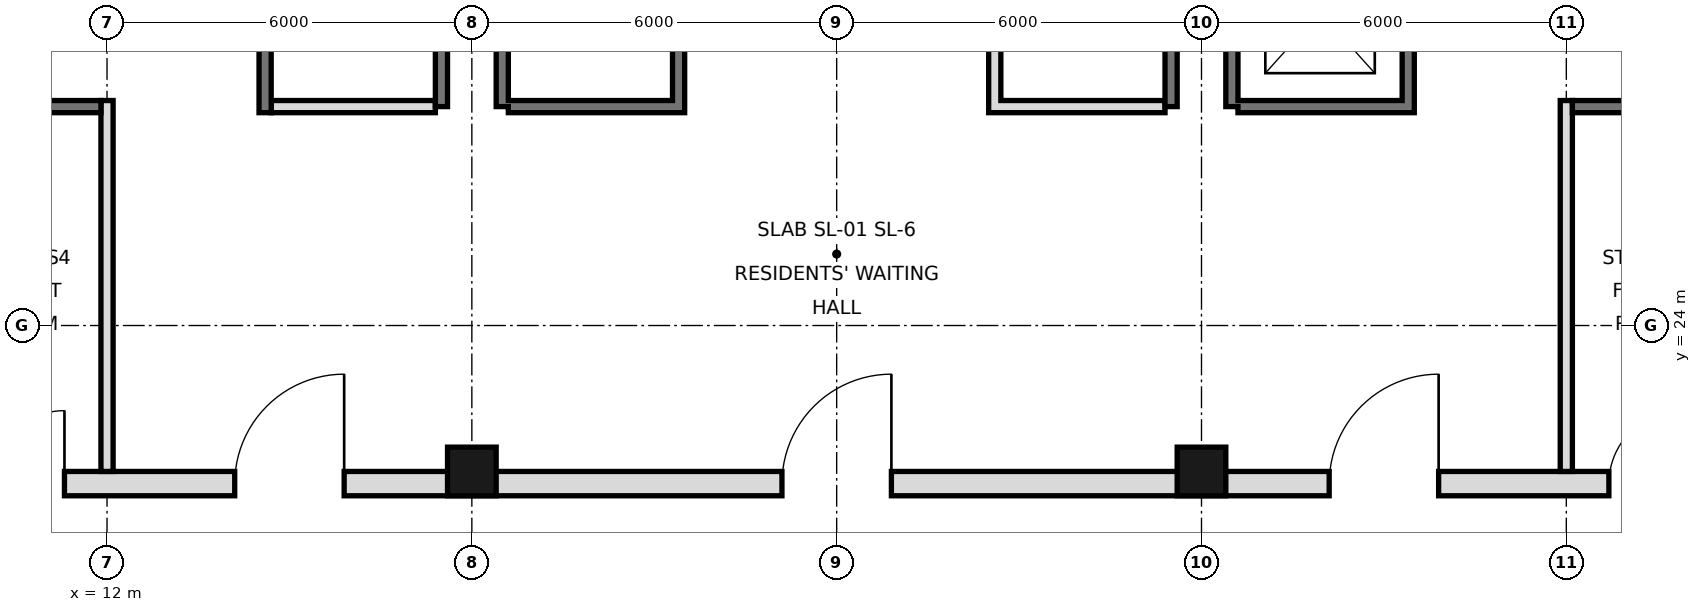
"""IFC4 building model, lengths in metres.
Left out: names, types, materials, properties, quantities, classifications, styles, units other than length and angle.
Written with IfcOpenShell. Run it as: python <this file> out.ifc"""

import sys

from ifc_helpers import new_model, si_unit, direction, frame, frame_2d, origin, origin_2d, place, context, subcontext, project, spatial, rectangle, hollow_rectangle, extrude, element, fill, save


model = new_model("IFC4")
c1 = context("Model", 3, precision=1e-05, world=origin(), true_north=direction((0.0, 1.0)))
c2 = subcontext(c1, "Body", "Model", "MODEL_VIEW")
j1 = project(units=[si_unit("LENGTHUNIT", "METRE"), si_unit("PLANEANGLEUNIT", "RADIAN")], contexts=[c1])
p1 = place(None, origin())
s1 = spatial("IfcSite", under=j1, at=p1, CompositionType="ELEMENT")
p2 = place(p1, origin())
s2 = spatial("IfcBuilding", under=s1, at=p2, CompositionType="ELEMENT")
p3 = place(p2, frame((0.0, 0.0, 192.0)))
s3 = spatial("IfcBuildingStorey", under=s2, at=p3, CompositionType="ELEMENT", Elevation=192.0)
for number, where, z_axis, x_axis in (
    (1, (18.0, 21.6, 0.0), (0.0, 0.0, 1.0), (1.0, 0.0, 0.0)),
    (2, (30.0, 21.6, 0.0), (0.0, 0.0, 1.0), (1.0, 0.0, 0.0)),
):
    element("IfcColumn", number, at=place(p3, frame(where, z_axis=z_axis, x_axis=x_axis)), inside=s3, PredefinedType="COLUMN", context=c2, shape_type="SweptSolid", body=[
        extrude(hollow_rectangle(XDim=0.8, YDim=0.8, WallThickness=0.045, at=origin_2d()), origin(), (0.0, 0.0, 1.0), 3.6),
    ])
for number, where, z_axis, x_axis in (
    (3, (17.5, 27.6, 0.0), (0.0, 0.0, 1.0), (0.0, 1.0, 0.0)),
    (4, (18.5, 27.6, 0.0), (0.0, 0.0, 1.0), (0.0, 1.0, 0.0)),
    (5, (29.5, 27.6, 0.0), (0.0, 0.0, 1.0), (0.0, 1.0, 0.0)),
    (6, (30.5, 27.6, 0.0), (0.0, 0.0, 1.0), (0.0, 1.0, 0.0)),
):
    element("IfcWall", number, at=place(p3, frame(where, z_axis=z_axis, x_axis=x_axis)), inside=s3, PredefinedType="SOLIDWALL", context=c2, shape_type="SweptSolid", body=[
        extrude(rectangle(XDim=17.5, YDim=0.2, at=frame_2d((8.75, 0.0))), origin(), (0.0, 0.0, 1.0), 3.42),
    ])
p4 = place(p3, frame((5.6, 21.4, 0.0), z_axis=(0.0, 0.0, 1.0), x_axis=(1.0, 0.0, 0.0)))
e7 = element("IfcWall", 7, at=p4, inside=s3, PredefinedType="SOLIDWALL", context=c2, shape_type="SweptSolid", body=[
    extrude(rectangle(XDim=36.8, YDim=0.4, at=frame_2d((18.4, 0.0))), origin(), (0.0, 0.0, 1.0), 3.42),
])
p5 = place(p4, frame((8.5, 0.0, 0.0)))
e8 = element("IfcOpeningElement", 8, at=p5, cuts=e7, PredefinedType="OPENING", context=c2, shape_type="SweptSolid", body=[
    extrude(rectangle(XDim=1.8, YDim=2.1, at=frame_2d((0.9, 1.05))), frame((0.0, 0.21, 0.0), z_axis=(0.0, -1.0, 0.0), x_axis=(1.0, 0.0, 0.0)), (0.0, 0.0, 1.0), 0.42),
])
p6 = place(p4, frame((17.5, 0.0, 0.0)))
e9 = element("IfcOpeningElement", 9, at=p6, cuts=e7, PredefinedType="OPENING", context=c2, shape_type="SweptSolid", body=[
    extrude(rectangle(XDim=1.8, YDim=2.1, at=frame_2d((0.9, 1.05))), frame((0.0, 0.21, 0.0), z_axis=(0.0, -1.0, 0.0), x_axis=(1.0, 0.0, 0.0)), (0.0, 0.0, 1.0), 0.42),
])
p7 = place(p4, frame((26.5, 0.0, 0.0)))
e10 = element("IfcOpeningElement", 10, at=p7, cuts=e7, PredefinedType="OPENING", context=c2, shape_type="SweptSolid", body=[
    extrude(rectangle(XDim=1.8, YDim=2.1, at=frame_2d((0.9, 1.05))), frame((0.0, 0.21, 0.0), z_axis=(0.0, -1.0, 0.0), x_axis=(1.0, 0.0, 0.0)), (0.0, 0.0, 1.0), 0.42),
])
p8 = place(p4, frame((4.5, 0.0, 0.0)))
e11 = element("IfcOpeningElement", 11, at=p8, cuts=e7, PredefinedType="OPENING", context=c2, shape_type="SweptSolid", body=[
    extrude(rectangle(XDim=1.2, YDim=2.1, at=frame_2d((0.6, 1.05))), frame((0.0, 0.21, 0.0), z_axis=(0.0, -1.0, 0.0), x_axis=(1.0, 0.0, 0.0)), (0.0, 0.0, 1.0), 0.42),
])
p9 = place(p4, frame((31.1, 0.0, 0.0)))
e12 = element("IfcOpeningElement", 12, at=p9, cuts=e7, PredefinedType="OPENING", context=c2, shape_type="SweptSolid", body=[
    extrude(rectangle(XDim=1.2, YDim=2.1, at=frame_2d((0.6, 1.05))), frame((0.0, 0.21, 0.0), z_axis=(0.0, -1.0, 0.0), x_axis=(1.0, 0.0, 0.0)), (0.0, 0.0, 1.0), 0.42),
])
p10 = place(p3, frame((12.0, 21.6, 0.0), z_axis=(0.0, 0.0, 1.0), x_axis=(0.0, 1.0, 0.0)))
e13 = element("IfcWall", 13, at=p10, inside=s3, PredefinedType="PARTITIONING", context=c2, shape_type="SweptSolid", body=[
    extrude(rectangle(XDim=6.1, YDim=0.2, at=frame_2d((3.05, 0.0))), origin(), (0.0, 0.0, 1.0), 3.42),
])
p11 = place(p3, frame((14.6, 27.5, 0.0), z_axis=(0.0, 0.0, 1.0), x_axis=(0.0, 1.0, 0.0)))
e14 = element("IfcWall", 14, at=p11, inside=s3, PredefinedType="SOLIDWALL", context=c2, shape_type="SweptSolid", body=[
    extrude(rectangle(XDim=17.5, YDim=0.2, at=frame_2d((8.75, 0.0))), origin(), (0.0, 0.0, 1.0), 3.42),
])
p12 = place(p11, frame((15.4, 0.0, 0.0)))
e15 = element("IfcOpeningElement", 15, at=p12, cuts=e14, PredefinedType="OPENING", context=c2, shape_type="SweptSolid", body=[
    extrude(rectangle(XDim=1.1, YDim=2.1, at=frame_2d((0.55, 1.05))), frame((0.0, 0.11, 0.0), z_axis=(0.0, -1.0, 0.0), x_axis=(1.0, 0.0, 0.0)), (0.0, 0.0, 1.0), 0.22),
])
p13 = place(p11, frame((2.7, 0.0, 0.0)))
e16 = element("IfcOpeningElement", 16, at=p13, cuts=e14, PredefinedType="OPENING", context=c2, shape_type="SweptSolid", body=[
    extrude(rectangle(XDim=1.0, YDim=2.1, at=frame_2d((0.5, 1.05))), frame((0.0, 0.11, 0.0), z_axis=(0.0, -1.0, 0.0), x_axis=(1.0, 0.0, 0.0)), (0.0, 0.0, 1.0), 0.22),
])
p14 = place(p11, frame((9.9, 0.0, 0.0)))
e17 = element("IfcOpeningElement", 17, at=p14, cuts=e14, PredefinedType="OPENING", context=c2, shape_type="SweptSolid", body=[
    extrude(rectangle(XDim=0.9, YDim=2.1, at=frame_2d((0.45, 1.05))), frame((0.0, 0.11, 0.0), z_axis=(0.0, -1.0, 0.0), x_axis=(1.0, 0.0, 0.0)), (0.0, 0.0, 1.0), 0.22),
])
p15 = place(p3, frame((21.4, 27.5, 0.0), z_axis=(0.0, 0.0, 1.0), x_axis=(0.0, 1.0, 0.0)))
e18 = element("IfcWall", 18, at=p15, inside=s3, PredefinedType="SOLIDWALL", context=c2, shape_type="SweptSolid", body=[
    extrude(rectangle(XDim=17.5, YDim=0.2, at=frame_2d((8.75, 0.0))), origin(), (0.0, 0.0, 1.0), 3.42),
])
p16 = place(p15, frame((16.2, 0.0, 0.0)))
e19 = element("IfcOpeningElement", 19, at=p16, cuts=e18, PredefinedType="OPENING", context=c2, shape_type="SweptSolid", body=[
    extrude(rectangle(XDim=1.0, YDim=2.1, at=frame_2d((0.5, 1.05))), frame((0.0, 0.11, 0.0), z_axis=(0.0, -1.0, 0.0), x_axis=(1.0, 0.0, 0.0)), (0.0, 0.0, 1.0), 0.22),
])
p17 = place(p15, frame((7.4, 0.0, 0.0)))
e20 = element("IfcOpeningElement", 20, at=p17, cuts=e18, PredefinedType="OPENING", context=c2, shape_type="SweptSolid", body=[
    extrude(rectangle(XDim=0.9, YDim=2.1, at=frame_2d((0.45, 1.05))), frame((0.0, 0.11, 0.0), z_axis=(0.0, -1.0, 0.0), x_axis=(1.0, 0.0, 0.0)), (0.0, 0.0, 1.0), 0.22),
])
p18 = place(p3, frame((26.6, 27.5, 0.0), z_axis=(0.0, 0.0, 1.0), x_axis=(0.0, 1.0, 0.0)))
e21 = element("IfcWall", 21, at=p18, inside=s3, PredefinedType="SOLIDWALL", context=c2, shape_type="SweptSolid", body=[
    extrude(rectangle(XDim=17.5, YDim=0.2, at=frame_2d((8.75, 0.0))), origin(), (0.0, 0.0, 1.0), 3.42),
])
p19 = place(p18, frame((4.3, 0.0, 0.0)))
e22 = element("IfcOpeningElement", 22, at=p19, cuts=e21, PredefinedType="OPENING", context=c2, shape_type="SweptSolid", body=[
    extrude(rectangle(XDim=0.9, YDim=2.1, at=frame_2d((0.45, 1.05))), frame((0.0, 0.11, 0.0), z_axis=(0.0, -1.0, 0.0), x_axis=(1.0, 0.0, 0.0)), (0.0, 0.0, 1.0), 0.22),
])
p20 = place(p18, frame((10.35, 0.0, 0.0)))
e23 = element("IfcOpeningElement", 23, at=p20, cuts=e21, PredefinedType="OPENING", context=c2, shape_type="SweptSolid", body=[
    extrude(rectangle(XDim=1.0, YDim=2.1, at=frame_2d((0.5, 1.05))), frame((0.0, 0.11, 0.0), z_axis=(0.0, -1.0, 0.0), x_axis=(1.0, 0.0, 0.0)), (0.0, 0.0, 1.0), 0.22),
])
p21 = place(p18, frame((14.575, 0.0, 0.0)))
e24 = element("IfcOpeningElement", 24, at=p21, cuts=e21, PredefinedType="OPENING", context=c2, shape_type="SweptSolid", body=[
    extrude(rectangle(XDim=1.0, YDim=2.1, at=frame_2d((0.5, 1.05))), frame((0.0, 0.11, 0.0), z_axis=(0.0, -1.0, 0.0), x_axis=(1.0, 0.0, 0.0)), (0.0, 0.0, 1.0), 0.22),
])
p22 = place(p3, frame((33.4, 27.5, 0.0), z_axis=(0.0, 0.0, 1.0), x_axis=(0.0, 1.0, 0.0)))
e25 = element("IfcWall", 25, at=p22, inside=s3, PredefinedType="SOLIDWALL", context=c2, shape_type="SweptSolid", body=[
    extrude(rectangle(XDim=17.5, YDim=0.2, at=frame_2d((8.75, 0.0))), origin(), (0.0, 0.0, 1.0), 3.42),
])
p23 = place(p22, frame((1.1, 0.0, 0.0)))
e26 = element("IfcOpeningElement", 26, at=p23, cuts=e25, PredefinedType="OPENING", context=c2, shape_type="SweptSolid", body=[
    extrude(rectangle(XDim=1.1, YDim=2.1, at=frame_2d((0.55, 1.05))), frame((0.0, 0.11, 0.0), z_axis=(0.0, -1.0, 0.0), x_axis=(1.0, 0.0, 0.0)), (0.0, 0.0, 1.0), 0.22),
])
p24 = place(p22, frame((4.2, 0.0, 0.0)))
e27 = element("IfcOpeningElement", 27, at=p24, cuts=e25, PredefinedType="OPENING", context=c2, shape_type="SweptSolid", body=[
    extrude(rectangle(XDim=1.1, YDim=2.1, at=frame_2d((0.55, 1.05))), frame((0.0, 0.11, 0.0), z_axis=(0.0, -1.0, 0.0), x_axis=(1.0, 0.0, 0.0)), (0.0, 0.0, 1.0), 0.22),
])
p25 = place(p22, frame((15.4, 0.0, 0.0)))
e28 = element("IfcOpeningElement", 28, at=p25, cuts=e25, PredefinedType="OPENING", context=c2, shape_type="SweptSolid", body=[
    extrude(rectangle(XDim=1.1, YDim=2.1, at=frame_2d((0.55, 1.05))), frame((0.0, 0.11, 0.0), z_axis=(0.0, -1.0, 0.0), x_axis=(1.0, 0.0, 0.0)), (0.0, 0.0, 1.0), 0.22),
])
p26 = place(p22, frame((9.9, 0.0, 0.0)))
e29 = element("IfcOpeningElement", 29, at=p26, cuts=e25, PredefinedType="OPENING", context=c2, shape_type="SweptSolid", body=[
    extrude(rectangle(XDim=0.9, YDim=2.1, at=frame_2d((0.45, 1.05))), frame((0.0, 0.11, 0.0), z_axis=(0.0, -1.0, 0.0), x_axis=(1.0, 0.0, 0.0)), (0.0, 0.0, 1.0), 0.22),
])
p27 = place(p3, frame((36.0, 21.6, 0.0), z_axis=(0.0, 0.0, 1.0), x_axis=(0.0, 1.0, 0.0)))
e30 = element("IfcWall", 30, at=p27, inside=s3, PredefinedType="PARTITIONING", context=c2, shape_type="SweptSolid", body=[
    extrude(rectangle(XDim=6.1, YDim=0.2, at=frame_2d((3.05, 0.0))), origin(), (0.0, 0.0, 1.0), 3.42),
])
p28 = place(p3, frame((14.7, 27.6, 0.0), z_axis=(0.0, 0.0, 1.0), x_axis=(1.0, 0.0, 0.0)))
e31 = element("IfcWall", 31, at=p28, inside=s3, PredefinedType="PARTITIONING", context=c2, shape_type="SweptSolid", body=[
    extrude(rectangle(XDim=2.7, YDim=0.2, at=frame_2d((1.35, 0.0))), origin(), (0.0, 0.0, 1.0), 3.42),
])
for number, where, z_axis, x_axis in (
    (32, (18.6, 27.6, 0.0), (0.0, 0.0, 1.0), (1.0, 0.0, 0.0)),
    (33, (26.7, 27.6, 0.0), (0.0, 0.0, 1.0), (1.0, 0.0, 0.0)),
    (34, (30.6, 27.6, 0.0), (0.0, 0.0, 1.0), (1.0, 0.0, 0.0)),
):
    element("IfcWall", number, at=place(p3, frame(where, z_axis=z_axis, x_axis=x_axis)), inside=s3, PredefinedType="SOLIDWALL", context=c2, shape_type="SweptSolid", body=[
        extrude(rectangle(XDim=2.7, YDim=0.2, at=frame_2d((1.35, 0.0))), origin(), (0.0, 0.0, 1.0), 3.42),
    ])
for number, where, z_axis, x_axis in (
    (35, (36.1, 27.6, 0.0), (0.0, 0.0, 1.0), (1.0, 0.0, 0.0)),
    (36, (6.6, 27.6, 0.0), (0.0, 0.0, 1.0), (1.0, 0.0, 0.0)),
):
    element("IfcWall", number, at=place(p3, frame(where, z_axis=z_axis, x_axis=x_axis)), inside=s3, PredefinedType="SOLIDWALL", context=c2, shape_type="SweptSolid", body=[
        extrude(rectangle(XDim=5.3, YDim=0.2, at=frame_2d((2.65, 0.0))), origin(), (0.0, 0.0, 1.0), 3.42),
    ])
p29 = place(p5, frame((1.8, 0.0, 0.0), z_axis=(0.0, 0.0, 1.0), x_axis=(-1.0, 0.0, 0.0)))
e37 = element("IfcDoor", 37, at=p29, inside=s3, OperationType="SINGLE_SWING_LEFT", PredefinedType="DOOR", context=c2, shape_type="SweptSolid", body=[
    extrude(rectangle(XDim=1.8, YDim=2.1, at=frame_2d((0.9, 1.05))), frame((0.0, 0.025, 0.0), z_axis=(0.0, -1.0, 0.0), x_axis=(1.0, 0.0, 0.0)), (0.0, 0.0, 1.0), 0.05),
])
fill(e8, e37)
p30 = place(p6, frame((1.8, 0.0, 0.0), z_axis=(0.0, 0.0, 1.0), x_axis=(-1.0, 0.0, 0.0)))
e38 = element("IfcDoor", 38, at=p30, inside=s3, OperationType="SINGLE_SWING_LEFT", PredefinedType="DOOR", context=c2, shape_type="SweptSolid", body=[
    extrude(rectangle(XDim=1.8, YDim=2.1, at=frame_2d((0.9, 1.05))), frame((0.0, 0.025, 0.0), z_axis=(0.0, -1.0, 0.0), x_axis=(1.0, 0.0, 0.0)), (0.0, 0.0, 1.0), 0.05),
])
fill(e9, e38)
p31 = place(p7, frame((1.8, 0.0, 0.0), z_axis=(0.0, 0.0, 1.0), x_axis=(-1.0, 0.0, 0.0)))
e39 = element("IfcDoor", 39, at=p31, inside=s3, OperationType="SINGLE_SWING_LEFT", PredefinedType="DOOR", context=c2, shape_type="SweptSolid", body=[
    extrude(rectangle(XDim=1.8, YDim=2.1, at=frame_2d((0.9, 1.05))), frame((0.0, 0.025, 0.0), z_axis=(0.0, -1.0, 0.0), x_axis=(1.0, 0.0, 0.0)), (0.0, 0.0, 1.0), 0.05),
])
fill(e10, e39)
p32 = place(p8, frame((1.2, 0.0, 0.0), z_axis=(0.0, 0.0, 1.0), x_axis=(-1.0, 0.0, 0.0)))
e40 = element("IfcDoor", 40, at=p32, inside=s3, OperationType="SINGLE_SWING_LEFT", PredefinedType="DOOR", context=c2, shape_type="SweptSolid", body=[
    extrude(rectangle(XDim=1.2, YDim=2.1, at=frame_2d((0.6, 1.05))), frame((0.0, 0.025, 0.0), z_axis=(0.0, -1.0, 0.0), x_axis=(1.0, 0.0, 0.0)), (0.0, 0.0, 1.0), 0.05),
])
fill(e11, e40)
p33 = place(p9, frame((1.2, 0.0, 0.0), z_axis=(0.0, 0.0, 1.0), x_axis=(-1.0, 0.0, 0.0)))
e41 = element("IfcDoor", 41, at=p33, inside=s3, OperationType="SINGLE_SWING_LEFT", PredefinedType="DOOR", context=c2, shape_type="SweptSolid", body=[
    extrude(rectangle(XDim=1.2, YDim=2.1, at=frame_2d((0.6, 1.05))), frame((0.0, 0.025, 0.0), z_axis=(0.0, -1.0, 0.0), x_axis=(1.0, 0.0, 0.0)), (0.0, 0.0, 1.0), 0.05),
])
fill(e12, e41)
save(model, sys.argv[1])
